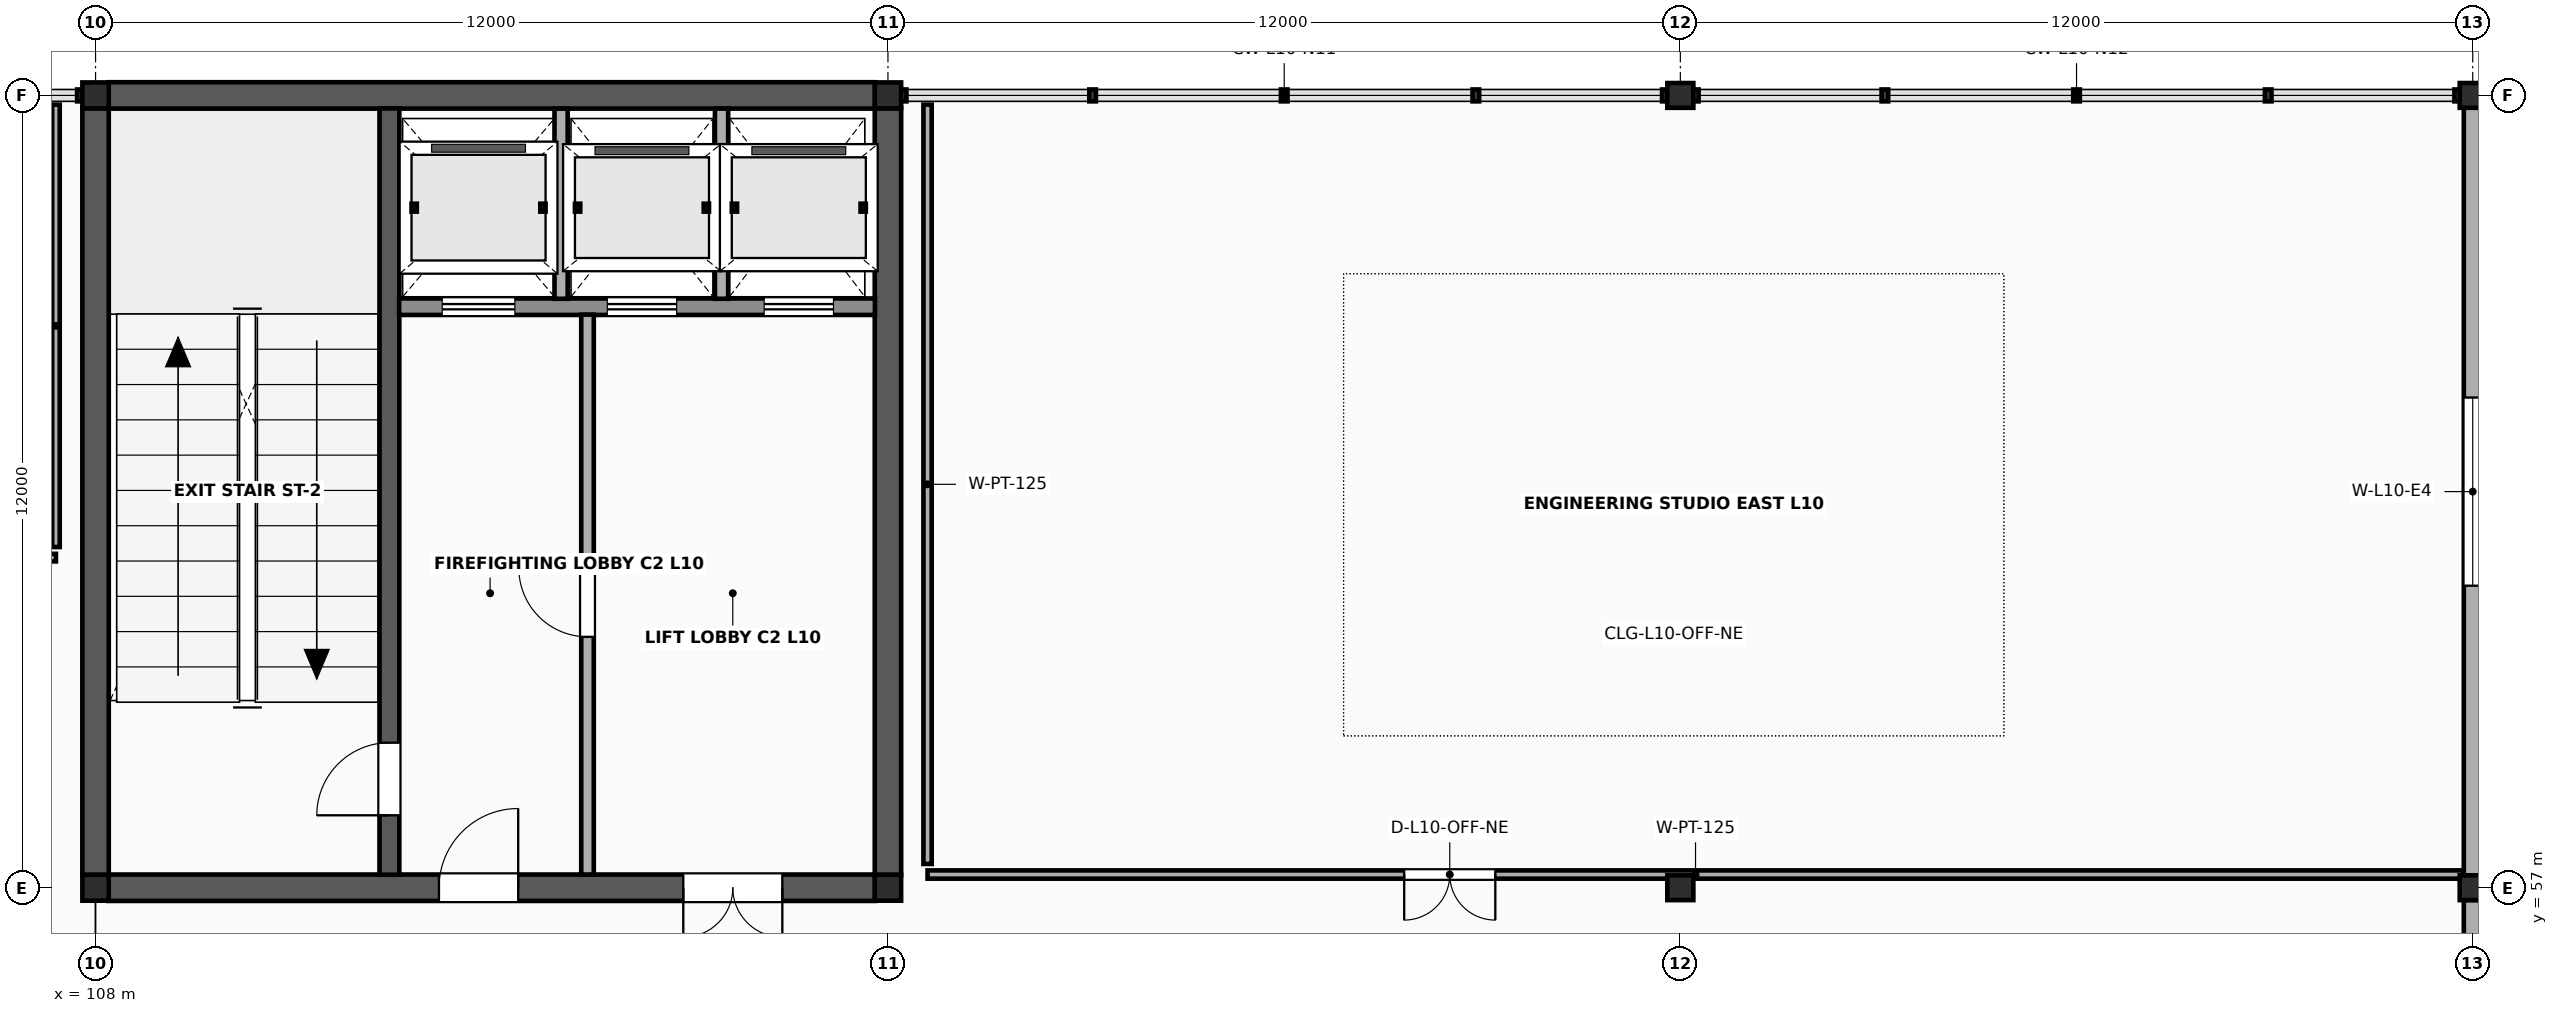
"""IFC4 building model, lengths in metres.
Left out: names, types, materials, properties, quantities, classifications, styles, units other than length and angle.
Written with IfcOpenShell. Run it as: python <this file> out.ifc"""

import sys

from ifc_helpers import new_model, si_unit, direction, frame, frame_2d, origin, origin_2d, place, context, subcontext, project, spatial, rectangle, i_section, extrude, element, fill, save


model = new_model("IFC4")
c1 = context("Model", 3, precision=1e-05, world=origin(), true_north=direction((0.0, 1.0)))
c2 = subcontext(c1, "Body", "Model", "MODEL_VIEW")
j1 = project(units=[si_unit("LENGTHUNIT", "METRE"), si_unit("PLANEANGLEUNIT", "RADIAN")], contexts=[c1])
p1 = place(None, origin())
s1 = spatial("IfcSite", under=j1, at=p1, CompositionType="ELEMENT")
p2 = place(p1, origin())
s2 = spatial("IfcBuilding", under=s1, at=p2, CompositionType="ELEMENT")
p3 = place(p2, frame((0.0, 0.0, 41.6)))
s3 = spatial("IfcBuildingStorey", under=s2, at=p3, CompositionType="ELEMENT", Elevation=41.6)
for number, where, z_axis, x_axis in (
    (1, (108.0, 57.0, 0.0), (0.0, 0.0, 1.0), (1.0, 0.0, 0.0)),
    (2, (108.0, 69.0, 0.0), (0.0, 0.0, 1.0), (1.0, 0.0, 0.0)),
    (3, (120.0, 57.0, 0.0), (0.0, 0.0, 1.0), (1.0, 0.0, 0.0)),
    (4, (120.0, 69.0, 0.0), (0.0, 0.0, 1.0), (1.0, 0.0, 0.0)),
):
    element("IfcColumn", number, at=place(p3, frame(where, z_axis=z_axis, x_axis=x_axis)), inside=s3, PredefinedType="COLUMN", context=c2, shape_type="SweptSolid", body=[
        extrude(i_section(OverallWidth=0.399, OverallDepth=0.393, WebThickness=0.023, FlangeThickness=0.037, FilletRadius=0.018, at=origin_2d()), origin(), (0.0, 0.0, 1.0), 4.0),
    ])
for number, where, z_axis, x_axis in (
    (5, (132.0, 57.0, 0.0), (0.0, 0.0, 1.0), (1.0, 0.0, 0.0)),
    (6, (132.0, 69.0, 0.0), (0.0, 0.0, 1.0), (1.0, 0.0, 0.0)),
    (7, (144.0, 57.0, 0.0), (0.0, 0.0, 1.0), (1.0, 0.0, 0.0)),
    (8, (144.0, 69.0, 0.0), (0.0, 0.0, 1.0), (1.0, 0.0, 0.0)),
):
    element("IfcColumn", number, at=place(p3, frame(where, z_axis=z_axis, x_axis=x_axis)), inside=s3, PredefinedType="COLUMN", context=c2, shape_type="SweptSolid", body=[
        extrude(i_section(OverallWidth=0.394, OverallDepth=0.375, WebThickness=0.017, FlangeThickness=0.028, FilletRadius=0.018, at=origin_2d()), origin(), (0.0, 0.0, 1.0), 4.0),
    ])
p4 = place(p3, frame((108.197, 57.0, 0.0), z_axis=(0.0, 0.0, 1.0), x_axis=(1.0, 0.0, 0.0)))
e9 = element("IfcWall", 9, at=p4, inside=s3, PredefinedType="SHEAR", context=c2, shape_type="SweptSolid", body=[
    extrude(rectangle(XDim=11.607, YDim=0.4, at=frame_2d((5.803, 0.0))), origin(), (0.0, 0.0, 1.0), 3.828),
])
p5 = place(p4, frame((5.004, 0.0, 0.0)))
e10 = element("IfcOpeningElement", 10, at=p5, cuts=e9, PredefinedType="OPENING", context=c2, shape_type="SweptSolid", body=[
    extrude(rectangle(XDim=1.2, YDim=2.2, at=frame_2d((0.6, 1.1))), frame((0.0, 0.215, 0.0), z_axis=(0.0, -1.0, 0.0), x_axis=(1.0, 0.0, 0.0)), (0.0, 0.0, 1.0), 0.43),
])
p6 = place(p4, frame((8.704, 0.0, 0.0)))
e11 = element("IfcOpeningElement", 11, at=p6, cuts=e9, PredefinedType="OPENING", context=c2, shape_type="SweptSolid", body=[
    extrude(rectangle(XDim=1.5, YDim=2.25, at=frame_2d((0.75, 1.125))), frame((0.0, 0.215, 0.0), z_axis=(0.0, -1.0, 0.0), x_axis=(1.0, 0.0, 0.0)), (0.0, 0.0, 1.0), 0.43),
])
p7 = place(p3, frame((108.197, 69.0, 0.0), z_axis=(0.0, 0.0, 1.0), x_axis=(1.0, 0.0, 0.0)))
e12 = element("IfcWall", 12, at=p7, inside=s3, PredefinedType="SHEAR", context=c2, shape_type="SweptSolid", body=[
    extrude(rectangle(XDim=11.607, YDim=0.4, at=frame_2d((5.803, 0.0))), origin(), (0.0, 0.0, 1.0), 3.828),
])
for number, where, z_axis, x_axis in (
    (13, (108.0, 57.194, 0.0), (0.0, 0.0, 1.0), (0.0, 1.0, 0.0)),
    (14, (120.0, 57.194, 0.0), (0.0, 0.0, 1.0), (0.0, 1.0, 0.0)),
):
    element("IfcWall", number, at=place(p3, frame(where, z_axis=z_axis, x_axis=x_axis)), inside=s3, PredefinedType="SHEAR", context=c2, shape_type="SweptSolid", body=[
        extrude(rectangle(XDim=11.613, YDim=0.4, at=frame_2d((5.806, 0.0))), origin(), (0.0, 0.0, 1.0), 3.828),
    ])
p8 = place(p3, frame((112.45, 57.197, 0.0), z_axis=(0.0, 0.0, 1.0), x_axis=(0.0, 1.0, 0.0)))
e15 = element("IfcWall", 15, at=p8, inside=s3, PredefinedType="SHEAR", context=c2, shape_type="SweptSolid", body=[
    extrude(rectangle(XDim=11.606, YDim=0.3, at=frame_2d((5.803, 0.0))), origin(), (0.0, 0.0, 1.0), 3.828),
])
p9 = place(p8, frame((0.9, 0.0, 0.0)))
e16 = element("IfcOpeningElement", 16, at=p9, cuts=e15, PredefinedType="OPENING", context=c2, shape_type="SweptSolid", body=[
    extrude(rectangle(XDim=1.1, YDim=2.2, at=frame_2d((0.55, 1.1))), frame((0.0, 0.165, 0.0), z_axis=(0.0, -1.0, 0.0), x_axis=(1.0, 0.0, 0.0)), (0.0, 0.0, 1.0), 0.33),
])
p10 = place(p3, frame((112.597, 65.8, 0.0), z_axis=(0.0, 0.0, 1.0), x_axis=(1.0, 0.0, 0.0)))
e17 = element("IfcWall", 17, at=p10, inside=s3, PredefinedType="SOLIDWALL", context=c2, shape_type="SweptSolid", body=[
    extrude(rectangle(XDim=7.206, YDim=0.25, at=frame_2d((3.603, 0.0))), origin(), (0.0, 0.0, 1.0), 3.828),
])
p11 = place(p10, frame((0.653, 0.0, 0.0)))
e18 = element("IfcOpeningElement", 18, at=p11, cuts=e17, PredefinedType="OPENING", context=c2, shape_type="SweptSolid", body=[
    extrude(rectangle(XDim=1.1, YDim=2.24, at=frame_2d((0.55, 1.12))), frame((0.0, 0.14, 0.0), z_axis=(0.0, -1.0, 0.0), x_axis=(1.0, 0.0, 0.0)), (0.0, 0.0, 1.0), 0.28),
])
p12 = place(p10, frame((3.153, 0.0, 0.0)))
e19 = element("IfcOpeningElement", 19, at=p12, cuts=e17, PredefinedType="OPENING", context=c2, shape_type="SweptSolid", body=[
    extrude(rectangle(XDim=1.05, YDim=2.2, at=frame_2d((0.525, 1.1))), frame((0.0, 0.14, 0.0), z_axis=(0.0, -1.0, 0.0), x_axis=(1.0, 0.0, 0.0)), (0.0, 0.0, 1.0), 0.28),
])
p13 = place(p10, frame((5.528, 0.0, 0.0)))
e20 = element("IfcOpeningElement", 20, at=p13, cuts=e17, PredefinedType="OPENING", context=c2, shape_type="SweptSolid", body=[
    extrude(rectangle(XDim=1.05, YDim=2.2, at=frame_2d((0.525, 1.1))), frame((0.0, 0.14, 0.0), z_axis=(0.0, -1.0, 0.0), x_axis=(1.0, 0.0, 0.0)), (0.0, 0.0, 1.0), 0.28),
])
for number, where, z_axis, x_axis in (
    (21, (115.05, 65.92, 0.0), (0.0, 0.0, 1.0), (0.0, 1.0, 0.0)),
    (22, (117.48, 65.92, 0.0), (0.0, 0.0, 1.0), (0.0, 1.0, 0.0)),
):
    element("IfcWall", number, at=place(p3, frame(where, z_axis=z_axis, x_axis=x_axis)), inside=s3, PredefinedType="SOLIDWALL", context=c2, shape_type="SweptSolid", body=[
        extrude(rectangle(XDim=2.88, YDim=0.2, at=frame_2d((1.44, 0.0))), origin(), (0.0, 0.0, 1.0), 3.818),
    ])
p14 = place(p3, frame((115.45, 57.2, 0.0), z_axis=(0.0, 0.0, 1.0), x_axis=(0.0, 1.0, 0.0)))
e23 = element("IfcWall", 23, at=p14, inside=s3, PredefinedType="SOLIDWALL", context=c2, shape_type="SweptSolid", body=[
    extrude(rectangle(XDim=8.48, YDim=0.19, at=frame_2d((4.24, 0.0))), origin(), (0.0, 0.0, 1.0), 3.818),
])
p15 = place(p14, frame((3.6, 0.0, 0.0)))
e24 = element("IfcOpeningElement", 24, at=p15, cuts=e23, PredefinedType="OPENING", context=c2, shape_type="SweptSolid", body=[
    extrude(rectangle(XDim=1.04, YDim=2.18, at=frame_2d((0.52, 1.09))), frame((0.0, 0.11, 0.0), z_axis=(0.0, -1.0, 0.0), x_axis=(1.0, 0.0, 0.0)), (0.0, 0.0, 1.0), 0.22),
])
p16 = place(p3, frame((144.0, 45.186, 0.0), z_axis=(0.0, 0.0, 1.0), x_axis=(0.0, 1.0, 0.0)))
e25 = element("IfcWall", 25, at=p16, inside=s3, PredefinedType="SOLIDWALL", context=c2, shape_type="SweptSolid", body=[
    extrude(rectangle(XDim=11.629, YDim=0.27, at=frame_2d((5.814, 0.0))), origin(), (0.0, 0.0, 1.0), 3.281),
])
p17 = place(p16, frame((4.54, 0.0, 1.4)))
e26 = element("IfcOpeningElement", 26, at=p17, cuts=e25, PredefinedType="OPENING", context=c2, shape_type="SweptSolid", body=[
    extrude(rectangle(XDim=2.55, YDim=0.88, at=frame_2d((1.275, 0.44))), frame((0.0, 0.15, 0.0), z_axis=(0.0, -1.0, 0.0), x_axis=(1.0, 0.0, 0.0)), (0.0, 0.0, 1.0), 0.3),
])
p18 = place(p3, frame((144.0, 57.186, 0.0), z_axis=(0.0, 0.0, 1.0), x_axis=(0.0, 1.0, 0.0)))
e27 = element("IfcWall", 27, at=p18, inside=s3, PredefinedType="SOLIDWALL", context=c2, shape_type="SweptSolid", body=[
    extrude(rectangle(XDim=11.629, YDim=0.27, at=frame_2d((5.814, 0.0))), origin(), (0.0, 0.0, 1.0), 3.281),
])
p19 = place(p18, frame((4.389, 0.0, 1.4)))
e28 = element("IfcOpeningElement", 28, at=p19, cuts=e27, PredefinedType="OPENING", context=c2, shape_type="SweptSolid", body=[
    extrude(rectangle(XDim=2.85, YDim=0.88, at=frame_2d((1.425, 0.44))), frame((0.0, 0.15, 0.0), z_axis=(0.0, -1.0, 0.0), x_axis=(1.0, 0.0, 0.0)), (0.0, 0.0, 1.0), 0.3),
])
p20 = place(p3, frame((84.6, 62.0, 0.0), z_axis=(0.0, 0.0, 1.0), x_axis=(1.0, 0.0, 0.0)))
e29 = element("IfcWall", 29, at=p20, inside=s3, PredefinedType="PARTITIONING", context=c2, shape_type="SweptSolid", body=[
    extrude(rectangle(XDim=22.8, YDim=0.115, at=frame_2d((11.4, 0.0))), origin(), (0.0, 0.0, 1.0), 2.88),
])
p21 = place(p20, frame((10.765, 0.0, 0.0)))
e30 = element("IfcOpeningElement", 30, at=p21, cuts=e29, PredefinedType="OPENING", context=c2, shape_type="SweptSolid", body=[
    extrude(rectangle(XDim=1.27, YDim=2.27, at=frame_2d((0.635, 1.135))), frame((0.0, 0.073, 0.0), z_axis=(0.0, -1.0, 0.0), x_axis=(1.0, 0.0, 0.0)), (0.0, 0.0, 1.0), 0.145),
])
p22 = place(p3, frame((107.4, 62.16, 0.0), z_axis=(0.0, 0.0, 1.0), x_axis=(0.0, 1.0, 0.0)))
e31 = element("IfcWall", 31, at=p22, inside=s3, PredefinedType="PARTITIONING", context=c2, shape_type="SweptSolid", body=[
    extrude(rectangle(XDim=6.7, YDim=0.115, at=frame_2d((3.35, 0.0))), origin(), (0.0, 0.0, 1.0), 2.88),
])
p23 = place(p3, frame((120.6, 57.2, 0.0), z_axis=(0.0, 0.0, 1.0), x_axis=(1.0, 0.0, 0.0)))
e32 = element("IfcWall", 32, at=p23, inside=s3, PredefinedType="PARTITIONING", context=c2, shape_type="SweptSolid", body=[
    extrude(rectangle(XDim=23.26, YDim=0.125, at=frame_2d((11.63, 0.0))), origin(), (0.0, 0.0, 1.0), 2.88),
])
p24 = place(p23, frame((7.218, 0.0, 0.0)))
e33 = element("IfcOpeningElement", 33, at=p24, cuts=e32, PredefinedType="OPENING", context=c2, shape_type="SweptSolid", body=[
    extrude(rectangle(XDim=1.38, YDim=2.23, at=frame_2d((0.69, 1.115))), frame((0.0, 0.077, 0.0), z_axis=(0.0, -1.0, 0.0), x_axis=(1.0, 0.0, 0.0)), (0.0, 0.0, 1.0), 0.155),
])
p25 = place(p3, frame((120.6, 57.36, 0.0), z_axis=(0.0, 0.0, 1.0), x_axis=(0.0, 1.0, 0.0)))
e34 = element("IfcWall", 34, at=p25, inside=s3, PredefinedType="PARTITIONING", context=c2, shape_type="SweptSolid", body=[
    extrude(rectangle(XDim=11.5, YDim=0.125, at=frame_2d((5.75, 0.0))), origin(), (0.0, 0.0, 1.0), 2.88),
])
p26 = place(p19, origin())
e35 = element("IfcWindow", 35, at=p26, inside=s3, PartitioningType="DOUBLE_PANEL_VERTICAL", PredefinedType="USERDEFINED", context=c2, shape_type="SweptSolid", body=[
    extrude(rectangle(XDim=2.85, YDim=0.88, at=frame_2d((1.425, 0.44))), frame((0.0, 0.03, 0.0), z_axis=(0.0, -1.0, 0.0), x_axis=(1.0, 0.0, 0.0)), (0.0, 0.0, 1.0), 0.06),
])
fill(e28, e35)
p27 = place(p9, origin())
e36 = element("IfcDoor", 36, at=p27, inside=s3, OperationType="SINGLE_SWING_LEFT", PredefinedType="DOOR", context=c2, shape_type="SweptSolid", body=[
    extrude(rectangle(XDim=1.1, YDim=2.2, at=frame_2d((0.55, 1.1))), frame((0.0, 0.025, 0.0), z_axis=(0.0, -1.0, 0.0), x_axis=(1.0, 0.0, 0.0)), (0.0, 0.0, 1.0), 0.05),
])
fill(e16, e36)
p28 = place(p15, origin())
e37 = element("IfcDoor", 37, at=p28, inside=s3, OperationType="SINGLE_SWING_RIGHT", PredefinedType="DOOR", context=c2, shape_type="SweptSolid", body=[
    extrude(rectangle(XDim=1.04, YDim=2.18, at=frame_2d((0.52, 1.09))), frame((0.0, 0.025, 0.0), z_axis=(0.0, -1.0, 0.0), x_axis=(1.0, 0.0, 0.0)), (0.0, 0.0, 1.0), 0.05),
])
fill(e24, e37)
p29 = place(p5, origin())
e38 = element("IfcDoor", 38, at=p29, inside=s3, OperationType="SINGLE_SWING_RIGHT", PredefinedType="DOOR", context=c2, shape_type="SweptSolid", body=[
    extrude(rectangle(XDim=1.2, YDim=2.2, at=frame_2d((0.6, 1.1))), frame((0.0, 0.025, 0.0), z_axis=(0.0, -1.0, 0.0), x_axis=(1.0, 0.0, 0.0)), (0.0, 0.0, 1.0), 0.05),
])
fill(e10, e38)
p30 = place(p6, origin())
e39 = element("IfcDoor", 39, at=p30, inside=s3, OperationType="DOUBLE_DOOR_SINGLE_SWING", PredefinedType="DOOR", context=c2, shape_type="SweptSolid", body=[
    extrude(rectangle(XDim=1.5, YDim=2.25, at=frame_2d((0.75, 1.125))), frame((0.0, 0.025, 0.0), z_axis=(0.0, -1.0, 0.0), x_axis=(1.0, 0.0, 0.0)), (0.0, 0.0, 1.0), 0.05),
])
fill(e11, e39)
p31 = place(p11, origin())
e40 = element("IfcDoor", 40, at=p31, inside=s3, OperationType="SLIDING_TO_LEFT", PredefinedType="USERDEFINED", context=c2, shape_type="SweptSolid", body=[
    extrude(rectangle(XDim=1.1, YDim=2.24, at=frame_2d((0.55, 1.12))), frame((0.0, 0.025, 0.0), z_axis=(0.0, -1.0, 0.0), x_axis=(1.0, 0.0, 0.0)), (0.0, 0.0, 1.0), 0.05),
])
fill(e18, e40)
p32 = place(p12, origin())
e41 = element("IfcDoor", 41, at=p32, inside=s3, OperationType="SLIDING_TO_LEFT", PredefinedType="USERDEFINED", context=c2, shape_type="SweptSolid", body=[
    extrude(rectangle(XDim=1.05, YDim=2.2, at=frame_2d((0.525, 1.1))), frame((0.0, 0.025, 0.0), z_axis=(0.0, -1.0, 0.0), x_axis=(1.0, 0.0, 0.0)), (0.0, 0.0, 1.0), 0.05),
])
fill(e19, e41)
p33 = place(p13, origin())
e42 = element("IfcDoor", 42, at=p33, inside=s3, OperationType="SLIDING_TO_LEFT", PredefinedType="USERDEFINED", context=c2, shape_type="SweptSolid", body=[
    extrude(rectangle(XDim=1.05, YDim=2.2, at=frame_2d((0.525, 1.1))), frame((0.0, 0.025, 0.0), z_axis=(0.0, -1.0, 0.0), x_axis=(1.0, 0.0, 0.0)), (0.0, 0.0, 1.0), 0.05),
])
fill(e20, e42)
p34 = place(p24, origin())
e43 = element("IfcDoor", 43, at=p34, inside=s3, OperationType="DOUBLE_DOOR_SINGLE_SWING", PredefinedType="DOOR", context=c2, shape_type="SweptSolid", body=[
    extrude(rectangle(XDim=1.38, YDim=2.23, at=frame_2d((0.69, 1.115))), frame((0.0, 0.025, 0.0), z_axis=(0.0, -1.0, 0.0), x_axis=(1.0, 0.0, 0.0)), (0.0, 0.0, 1.0), 0.05),
])
fill(e33, e43)
save(model, sys.argv[1])
